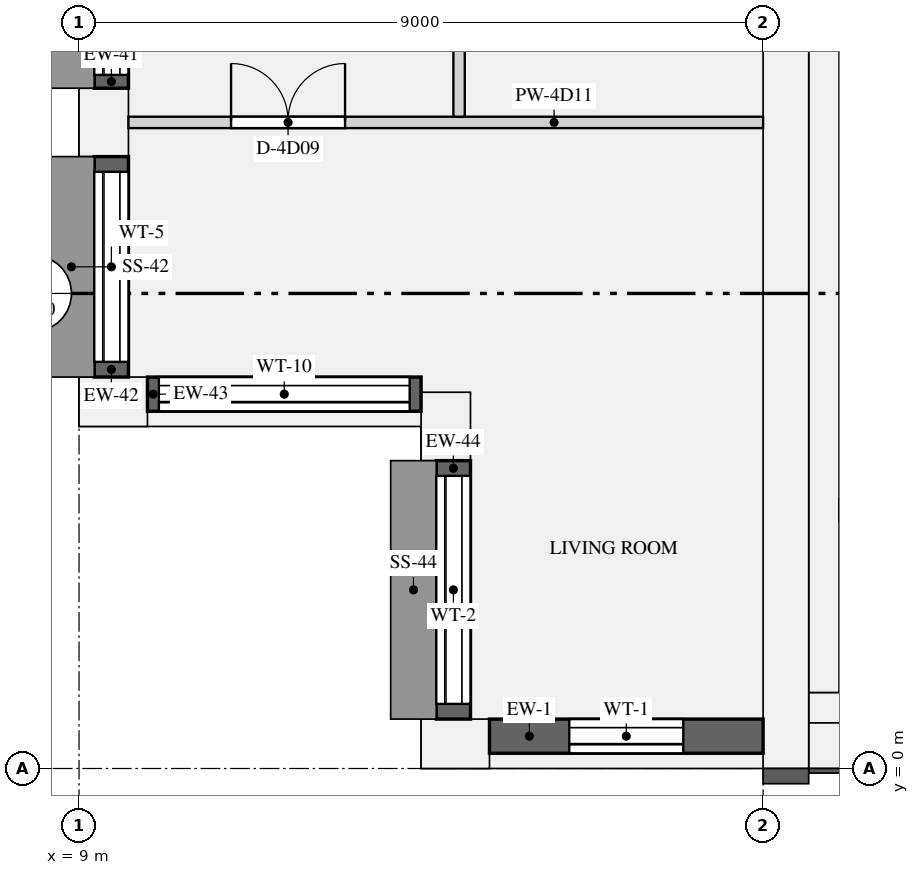
"""IFC4 building model, lengths in metres.
Left out: names, types, materials, properties, quantities, classifications, styles, units other than length and angle.
Written with IfcOpenShell. Run it as: python <this file> out.ifc"""

import sys

from ifc_helpers import new_model, si_unit, direction, frame, frame_2d, origin, origin_2d, place, context, subcontext, project, spatial, rectangle, extrude, element, fill, save


model = new_model("IFC4")
c1 = context("Model", 3, precision=1e-05, world=origin(), true_north=direction((0.0, 1.0)))
c2 = subcontext(c1, "Body", "Model", "MODEL_VIEW")
j1 = project(units=[si_unit("LENGTHUNIT", "METRE"), si_unit("PLANEANGLEUNIT", "RADIAN")], contexts=[c1])
p1 = place(None, origin())
s1 = spatial("IfcSite", under=j1, at=p1, CompositionType="ELEMENT")
p2 = place(p1, origin())
s2 = spatial("IfcBuilding", under=s1, at=p2, CompositionType="ELEMENT")
p3 = place(p2, frame((0.0, 0.0, 223.2)))
s3 = spatial("IfcBuildingStorey", under=s2, at=p3, CompositionType="ELEMENT", Elevation=223.2)
for number, where, z_axis, x_axis in (
    (1, (13.95, 0.325, 0.0), (0.0, 0.0, 1.0), (1.0, 0.0, 0.0)),
    (2, (9.325, 8.5, 0.0), (0.0, 0.0, 1.0), (0.0, -1.0, 0.0)),
    (3, (9.45, 4.825, 0.0), (0.0, 0.0, 1.0), (1.0, 0.0, 0.0)),
    (4, (13.825, 4.5, 0.0), (0.0, 0.0, 1.0), (0.0, -1.0, 0.0)),
):
    element("IfcColumn", number, at=place(p3, frame(where, z_axis=z_axis, x_axis=x_axis)), inside=s3, PredefinedType="USERDEFINED", context=c2, shape_type="SweptSolid", body=[
        extrude(rectangle(XDim=0.9, YDim=0.65, at=origin_2d()), origin(), (0.0, 0.0, 1.0), 3.15),
    ])
p4 = place(p3, frame((18.3, 0.0, 0.0), z_axis=(0.0, 0.0, 1.0), x_axis=(0.0, 1.0, 0.0)))
e5 = element("IfcWall", 5, at=p4, inside=s3, PredefinedType="SHEAR", context=c2, shape_type="SweptSolid", body=[
    extrude(rectangle(XDim=12.5, YDim=0.6, at=frame_2d((6.25, 0.0))), origin(), (0.0, 0.0, 1.0), 3.15),
])
p5 = place(p3, frame((18.6, 0.3, 0.0), z_axis=(0.0, 0.0, 1.0), x_axis=(1.0, 0.0, 0.0)))
e6 = element("IfcWall", 6, at=p5, inside=s3, PredefinedType="SHEAR", context=c2, shape_type="SweptSolid", body=[
    extrude(rectangle(XDim=34.8, YDim=0.6, at=frame_2d((17.4, 0.0))), origin(), (0.0, 0.0, 1.0), 3.15),
])
p6 = place(p3, frame((18.8, 1.0, 0.0), z_axis=(0.0, 0.0, 1.0), x_axis=(0.0, 1.0, 0.0)))
e7 = element("IfcWall", 7, at=p6, inside=s3, PredefinedType="SHEAR", context=c2, shape_type="SweptSolid", body=[
    extrude(rectangle(XDim=10.9, YDim=0.4, at=frame_2d((5.45, 0.0))), origin(), (0.0, 0.0, 1.0), 3.15),
])
p7 = place(p3, frame((18.6, 0.8, 0.0), z_axis=(0.0, 0.0, 1.0), x_axis=(1.0, 0.0, 0.0)))
e8 = element("IfcWall", 8, at=p7, inside=s3, PredefinedType="SHEAR", context=c2, shape_type="SweptSolid", body=[
    extrude(rectangle(XDim=34.8, YDim=0.4, at=frame_2d((17.4, 0.0))), origin(), (0.0, 0.0, 1.0), 3.15),
])
p8 = place(p3, frame((19.0, 3.4, 0.0), z_axis=(0.0, 0.0, 1.0), x_axis=(1.0, 0.0, 0.0)))
e9 = element("IfcWall", 9, at=p8, inside=s3, PredefinedType="SHEAR", context=c2, shape_type="SweptSolid", body=[
    extrude(rectangle(XDim=2.55, YDim=0.3, at=frame_2d((1.275, 0.0))), origin(), (0.0, 0.0, 1.0), 3.15),
])
p9 = place(p8, frame((0.675, 0.0, 0.0)))
e10 = element("IfcOpeningElement", 10, at=p9, cuts=e9, PredefinedType="OPENING", context=c2, shape_type="SweptSolid", body=[
    extrude(rectangle(XDim=1.2, YDim=2.1, at=frame_2d((0.6, 1.05))), frame((0.0, 0.16, 0.0), z_axis=(0.0, -1.0, 0.0), x_axis=(1.0, 0.0, 0.0)), (0.0, 0.0, 1.0), 0.32),
])
p10 = place(p3, frame((14.4, 0.425, 0.9), z_axis=(0.0, 0.0, 1.0), x_axis=(1.0, 0.0, 0.0)))
e11 = element("IfcWall", 11, at=p10, inside=s3, PredefinedType="SOLIDWALL", context=c2, shape_type="SweptSolid", body=[
    extrude(rectangle(XDim=3.6, YDim=0.45, at=frame_2d((1.8, 0.0))), origin(), (0.0, 0.0, 1.0), 1.93),
])
p11 = place(p10, frame((1.05, 0.0, 0.15)))
e12 = element("IfcOpeningElement", 12, at=p11, cuts=e11, PredefinedType="OPENING", context=c2, shape_type="SweptSolid", body=[
    extrude(rectangle(XDim=1.5, YDim=1.5, at=frame_2d((0.75, 0.75))), frame((0.0, 0.235, 0.0), z_axis=(0.0, -1.0, 0.0), x_axis=(1.0, 0.0, 0.0)), (0.0, 0.0, 1.0), 0.47),
])
p12 = place(p3, frame((9.425, 12.05, 0.9), z_axis=(0.0, 0.0, 1.0), x_axis=(0.0, -1.0, 0.0)))
e13 = element("IfcWall", 13, at=p12, inside=s3, PredefinedType="SOLIDWALL", context=c2, shape_type="SweptSolid", body=[
    extrude(rectangle(XDim=3.1, YDim=0.45, at=frame_2d((1.55, 0.0))), origin(), (0.0, 0.0, 1.0), 1.93),
])
p13 = place(p12, frame((0.175, 0.0, 0.15)))
e14 = element("IfcOpeningElement", 14, at=p13, cuts=e13, PredefinedType="OPENING", context=c2, shape_type="SweptSolid", body=[
    extrude(rectangle(XDim=2.75, YDim=1.5, at=frame_2d((1.375, 0.75))), frame((0.0, 0.235, 0.0), z_axis=(0.0, -1.0, 0.0), x_axis=(1.0, 0.0, 0.0)), (0.0, 0.0, 1.0), 0.47),
])
p14 = place(p3, frame((9.425, 8.05, 0.9), z_axis=(0.0, 0.0, 1.0), x_axis=(0.0, -1.0, 0.0)))
e15 = element("IfcWall", 15, at=p14, inside=s3, PredefinedType="SOLIDWALL", context=c2, shape_type="SweptSolid", body=[
    extrude(rectangle(XDim=2.9, YDim=0.45, at=frame_2d((1.45, 0.0))), origin(), (0.0, 0.0, 1.0), 1.93),
])
p15 = place(p14, frame((0.2, 0.0, 0.15)))
e16 = element("IfcOpeningElement", 16, at=p15, cuts=e15, PredefinedType="OPENING", context=c2, shape_type="SweptSolid", body=[
    extrude(rectangle(XDim=2.5, YDim=1.5, at=frame_2d((1.25, 0.75))), frame((0.0, 0.235, 0.0), z_axis=(0.0, -1.0, 0.0), x_axis=(1.0, 0.0, 0.0)), (0.0, 0.0, 1.0), 0.47),
])
p16 = place(p3, frame((9.9, 4.925, 0.9), z_axis=(0.0, 0.0, 1.0), x_axis=(1.0, 0.0, 0.0)))
e17 = element("IfcWall", 17, at=p16, inside=s3, PredefinedType="SOLIDWALL", context=c2, shape_type="SweptSolid", body=[
    extrude(rectangle(XDim=3.6, YDim=0.45, at=frame_2d((1.8, 0.0))), origin(), (0.0, 0.0, 1.0), 1.93),
])
p17 = place(p16, frame((0.15, 0.0, 0.15)))
e18 = element("IfcOpeningElement", 18, at=p17, cuts=e17, PredefinedType="OPENING", context=c2, shape_type="SweptSolid", body=[
    extrude(rectangle(XDim=3.3, YDim=1.5, at=frame_2d((1.65, 0.75))), frame((0.0, 0.235, 0.0), z_axis=(0.0, -1.0, 0.0), x_axis=(1.0, 0.0, 0.0)), (0.0, 0.0, 1.0), 0.47),
])
p18 = place(p3, frame((13.925, 4.05, 0.9), z_axis=(0.0, 0.0, 1.0), x_axis=(0.0, -1.0, 0.0)))
e19 = element("IfcWall", 19, at=p18, inside=s3, PredefinedType="SOLIDWALL", context=c2, shape_type="SweptSolid", body=[
    extrude(rectangle(XDim=3.4, YDim=0.45, at=frame_2d((1.7, 0.0))), origin(), (0.0, 0.0, 1.0), 1.93),
])
p19 = place(p18, frame((0.2, 0.0, 0.15)))
e20 = element("IfcOpeningElement", 20, at=p19, cuts=e19, PredefinedType="OPENING", context=c2, shape_type="SweptSolid", body=[
    extrude(rectangle(XDim=3.0, YDim=1.5, at=frame_2d((1.5, 0.75))), frame((0.0, 0.235, 0.0), z_axis=(0.0, -1.0, 0.0), x_axis=(1.0, 0.0, 0.0)), (0.0, 0.0, 1.0), 0.47),
])
p20 = place(p3, frame((9.65, 8.5, 0.0), z_axis=(0.0, 0.0, 1.0), x_axis=(1.0, 0.0, 0.0)))
e21 = element("IfcWall", 21, at=p20, inside=s3, PredefinedType="PARTITIONING", context=c2, shape_type="SweptSolid", body=[
    extrude(rectangle(XDim=8.35, YDim=0.15, at=frame_2d((4.175, 0.0))), origin(), (0.0, 0.0, 1.0), 2.83),
])
p21 = place(p20, frame((1.35, 0.0, 0.0)))
e22 = element("IfcOpeningElement", 22, at=p21, cuts=e21, PredefinedType="OPENING", context=c2, shape_type="SweptSolid", body=[
    extrude(rectangle(XDim=1.5, YDim=2.1, at=frame_2d((0.75, 1.05))), frame((0.0, 0.085, 0.0), z_axis=(0.0, -1.0, 0.0), x_axis=(1.0, 0.0, 0.0)), (0.0, 0.0, 1.0), 0.17),
])
p22 = place(p3, frame((14.0, 8.575, 0.0), z_axis=(0.0, 0.0, 1.0), x_axis=(0.0, 1.0, 0.0)))
e23 = element("IfcWall", 23, at=p22, inside=s3, PredefinedType="PARTITIONING", context=c2, shape_type="SweptSolid", body=[
    extrude(rectangle(XDim=7.85, YDim=0.15, at=frame_2d((3.925, 0.0))), origin(), (0.0, 0.0, 1.0), 2.83),
])
p23 = place(p22, frame((2.725, 0.0, 0.0)))
e24 = element("IfcOpeningElement", 24, at=p23, cuts=e23, PredefinedType="OPENING", context=c2, shape_type="SweptSolid", body=[
    extrude(rectangle(XDim=0.9, YDim=2.1, at=frame_2d((0.45, 1.05))), frame((0.0, 0.085, 0.0), z_axis=(0.0, -1.0, 0.0), x_axis=(1.0, 0.0, 0.0)), (0.0, 0.0, 1.0), 0.17),
])
p24 = place(p22, frame((5.475, 0.0, 0.0)))
e25 = element("IfcOpeningElement", 25, at=p24, cuts=e23, PredefinedType="OPENING", context=c2, shape_type="SweptSolid", body=[
    extrude(rectangle(XDim=0.9, YDim=2.1, at=frame_2d((0.45, 1.05))), frame((0.0, 0.085, 0.0), z_axis=(0.0, -1.0, 0.0), x_axis=(1.0, 0.0, 0.0)), (0.0, 0.0, 1.0), 0.17),
])
p25 = place(p11, origin())
e26 = element("IfcWindow", 26, at=p25, inside=s3, PartitioningType="SINGLE_PANEL", PredefinedType="WINDOW", context=c2, shape_type="SweptSolid", body=[
    extrude(rectangle(XDim=1.5, YDim=1.5, at=frame_2d((0.75, 0.75))), frame((0.0, -0.065, 0.0), z_axis=(0.0, -1.0, 0.0), x_axis=(1.0, 0.0, 0.0)), (0.0, 0.0, 1.0), 0.06),
])
fill(e12, e26)
p26 = place(p13, origin())
e27 = element("IfcWindow", 27, at=p26, inside=s3, PartitioningType="SINGLE_PANEL", PredefinedType="WINDOW", context=c2, shape_type="SweptSolid", body=[
    extrude(rectangle(XDim=2.75, YDim=1.5, at=frame_2d((1.375, 0.75))), frame((0.0, -0.065, 0.0), z_axis=(0.0, -1.0, 0.0), x_axis=(1.0, 0.0, 0.0)), (0.0, 0.0, 1.0), 0.06),
])
fill(e14, e27)
p27 = place(p15, origin())
e28 = element("IfcWindow", 28, at=p27, inside=s3, PartitioningType="SINGLE_PANEL", PredefinedType="WINDOW", context=c2, shape_type="SweptSolid", body=[
    extrude(rectangle(XDim=2.5, YDim=1.5, at=frame_2d((1.25, 0.75))), frame((0.0, -0.065, 0.0), z_axis=(0.0, -1.0, 0.0), x_axis=(1.0, 0.0, 0.0)), (0.0, 0.0, 1.0), 0.06),
])
fill(e16, e28)
p28 = place(p17, origin())
e29 = element("IfcWindow", 29, at=p28, inside=s3, PartitioningType="SINGLE_PANEL", PredefinedType="WINDOW", context=c2, shape_type="SweptSolid", body=[
    extrude(rectangle(XDim=3.3, YDim=1.5, at=frame_2d((1.65, 0.75))), frame((0.0, -0.065, 0.0), z_axis=(0.0, -1.0, 0.0), x_axis=(1.0, 0.0, 0.0)), (0.0, 0.0, 1.0), 0.06),
])
fill(e18, e29)
p29 = place(p19, origin())
e30 = element("IfcWindow", 30, at=p29, inside=s3, PartitioningType="SINGLE_PANEL", PredefinedType="WINDOW", context=c2, shape_type="SweptSolid", body=[
    extrude(rectangle(XDim=3.0, YDim=1.5, at=frame_2d((1.5, 0.75))), frame((0.0, -0.065, 0.0), z_axis=(0.0, -1.0, 0.0), x_axis=(1.0, 0.0, 0.0)), (0.0, 0.0, 1.0), 0.06),
])
fill(e20, e30)
p30 = place(p21, origin())
e31 = element("IfcDoor", 31, at=p30, inside=s3, OperationType="DOUBLE_DOOR_SINGLE_SWING", PredefinedType="DOOR", context=c2, shape_type="SweptSolid", body=[
    extrude(rectangle(XDim=1.5, YDim=2.1, at=frame_2d((0.75, 1.05))), frame((0.0, 0.025, 0.0), z_axis=(0.0, -1.0, 0.0), x_axis=(1.0, 0.0, 0.0)), (0.0, 0.0, 1.0), 0.05),
])
fill(e22, e31)
save(model, sys.argv[1])
